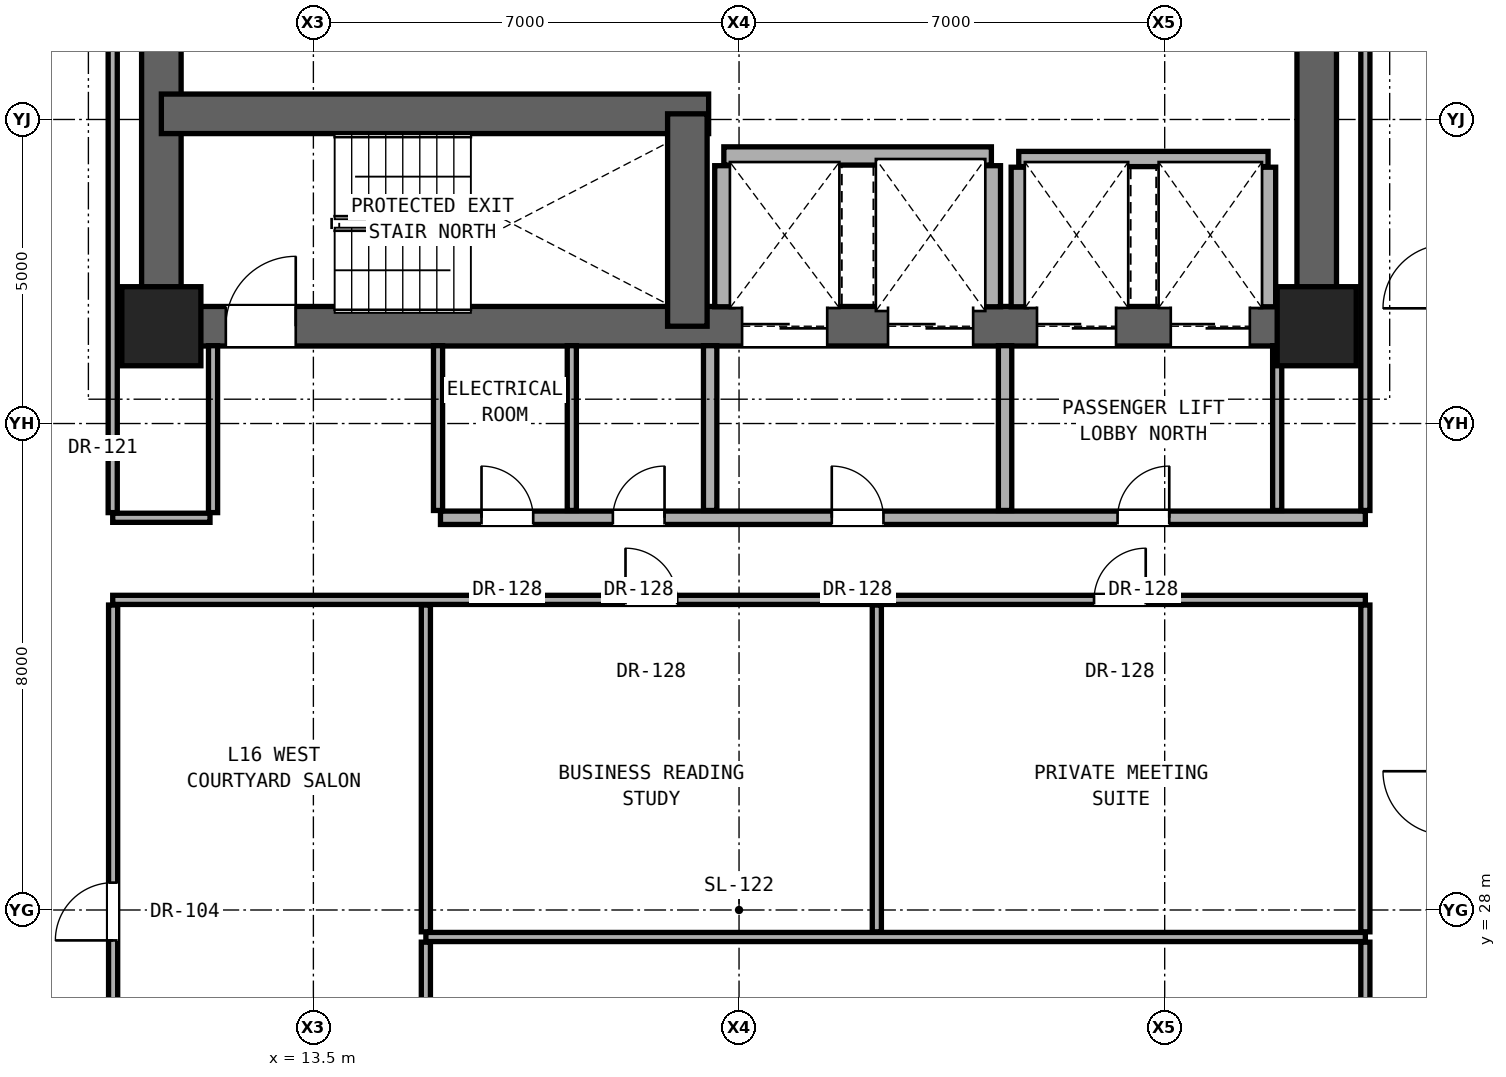
"""IFC4 building model, lengths in metres.
Left out: names, types, materials, properties, quantities, classifications, styles, units other than length and angle.
Written with IfcOpenShell. Run it as: python <this file> out.ifc"""

import sys

from ifc_helpers import new_model, si_unit, direction, frame, frame_2d, origin, origin_2d, place, context, subcontext, project, spatial, rectangle, extrude, element, fill, save


model = new_model("IFC4")
c1 = context("Model", 3, precision=1e-05, world=origin(), true_north=direction((0.0, 1.0)))
c2 = subcontext(c1, "Body", "Model", "MODEL_VIEW")
j1 = project(units=[si_unit("LENGTHUNIT", "METRE"), si_unit("PLANEANGLEUNIT", "RADIAN")], contexts=[c1])
p1 = place(None, origin())
s1 = spatial("IfcSite", under=j1, at=p1, CompositionType="ELEMENT")
p2 = place(p1, origin())
s2 = spatial("IfcBuilding", under=s1, at=p2, CompositionType="ELEMENT")
p3 = place(p2, frame((0.0, 0.0, 58.7)))
s3 = spatial("IfcBuildingStorey", under=s2, at=p3, CompositionType="ELEMENT", Elevation=58.7)
for number, where, z_axis, x_axis in (
    (1, (11.0, 37.6, 0.0), (0.0, 0.0, 1.0), (1.0, 0.0, 0.0)),
    (2, (30.0, 37.6, 0.0), (0.0, 0.0, 1.0), (1.0, 0.0, 0.0)),
):
    element("IfcColumn", number, at=place(p3, frame(where, z_axis=z_axis, x_axis=x_axis)), inside=s3, PredefinedType="COLUMN", context=c2, shape_type="SweptSolid", body=[
        extrude(rectangle(XDim=1.3, YDim=1.3, at=origin_2d()), origin(), (0.0, 0.0, 1.0), 3.3),
    ])
for number, where, z_axis, x_axis in (
    (3, (11.0, 37.6, 0.0), (0.0, 0.0, 1.0), (0.0, 1.0, 0.0)),
    (4, (30.0, 37.6, 0.0), (0.0, 0.0, 1.0), (0.0, 1.0, 0.0)),
):
    element("IfcWall", number, at=place(p3, frame(where, z_axis=z_axis, x_axis=x_axis)), inside=s3, PredefinedType="SHEAR", context=c2, shape_type="SweptSolid", body=[
        extrude(rectangle(XDim=6.0, YDim=0.65, at=frame_2d((3.0, 0.0))), origin(), (0.0, 0.0, 1.0), 3.06),
    ])
p4 = place(p3, frame((11.0, 37.6, 0.0), z_axis=(0.0, 0.0, 1.0), x_axis=(1.0, 0.0, 0.0)))
e5 = element("IfcWall", 5, at=p4, inside=s3, PredefinedType="SHEAR", context=c2, shape_type="SweptSolid", body=[
    extrude(rectangle(XDim=19.0, YDim=0.65, at=frame_2d((9.5, 0.0))), origin(), (0.0, 0.0, 1.0), 3.06),
])
p5 = place(p4, frame((1.06, 0.0, 0.0)))
e6 = element("IfcOpeningElement", 6, at=p5, cuts=e5, PredefinedType="OPENING", context=c2, shape_type="SweptSolid", body=[
    extrude(rectangle(XDim=1.15, YDim=2.2, at=frame_2d((0.575, 1.1))), frame((0.0, 0.335, 0.0), z_axis=(0.0, -1.0, 0.0), x_axis=(1.0, 0.0, 0.0)), (0.0, 0.0, 1.0), 0.67),
])
p6 = place(p4, frame((9.55, 0.0, 0.0)))
e7 = element("IfcOpeningElement", 7, at=p6, cuts=e5, PredefinedType="OPENING", context=c2, shape_type="SweptSolid", body=[
    extrude(rectangle(XDim=1.4, YDim=2.35, at=frame_2d((0.7, 1.175))), frame((0.0, 0.335, 0.0), z_axis=(0.0, -1.0, 0.0), x_axis=(1.0, 0.0, 0.0)), (0.0, 0.0, 1.0), 0.67),
])
p7 = place(p4, frame((11.95, 0.0, 0.0)))
e8 = element("IfcOpeningElement", 8, at=p7, cuts=e5, PredefinedType="OPENING", context=c2, shape_type="SweptSolid", body=[
    extrude(rectangle(XDim=1.4, YDim=2.35, at=frame_2d((0.7, 1.175))), frame((0.0, 0.335, 0.0), z_axis=(0.0, -1.0, 0.0), x_axis=(1.0, 0.0, 0.0)), (0.0, 0.0, 1.0), 0.67),
])
p8 = place(p4, frame((14.4, 0.0, 0.0)))
e9 = element("IfcOpeningElement", 9, at=p8, cuts=e5, PredefinedType="OPENING", context=c2, shape_type="SweptSolid", body=[
    extrude(rectangle(XDim=1.3, YDim=2.3, at=frame_2d((0.65, 1.15))), frame((0.0, 0.335, 0.0), z_axis=(0.0, -1.0, 0.0), x_axis=(1.0, 0.0, 0.0)), (0.0, 0.0, 1.0), 0.67),
])
p9 = place(p4, frame((16.6, 0.0, 0.0)))
e10 = element("IfcOpeningElement", 10, at=p9, cuts=e5, PredefinedType="OPENING", context=c2, shape_type="SweptSolid", body=[
    extrude(rectangle(XDim=1.3, YDim=2.3, at=frame_2d((0.65, 1.15))), frame((0.0, 0.335, 0.0), z_axis=(0.0, -1.0, 0.0), x_axis=(1.0, 0.0, 0.0)), (0.0, 0.0, 1.0), 0.67),
])
p10 = place(p3, frame((11.0, 41.093, 0.0), z_axis=(0.0, 0.0, 1.0), x_axis=(1.0, 0.0, 0.0)))
e11 = element("IfcWall", 11, at=p10, inside=s3, PredefinedType="SHEAR", context=c2, shape_type="SweptSolid", body=[
    extrude(rectangle(XDim=9.0, YDim=0.65, at=frame_2d((4.5, 0.0))), origin(), (0.0, 0.0, 1.0), 3.06),
])
p11 = place(p3, frame((19.65, 37.6, 0.0), z_axis=(0.0, 0.0, 1.0), x_axis=(0.0, 1.0, 0.0)))
e12 = element("IfcWall", 12, at=p11, inside=s3, PredefinedType="SHEAR", context=c2, shape_type="SweptSolid", body=[
    extrude(rectangle(XDim=3.493, YDim=0.65, at=frame_2d((1.747, 0.0))), origin(), (0.0, 0.0, 1.0), 3.06),
])
p12 = place(p3, frame((15.35, 27.556, 0.0), z_axis=(0.0, 0.0, 1.0), x_axis=(1.0, 0.0, 0.0)))
e13 = element("IfcWall", 13, at=p12, inside=s3, PredefinedType="PARTITIONING", context=c2, shape_type="SweptSolid", body=[
    extrude(rectangle(XDim=15.45, YDim=0.15, at=frame_2d((7.725, 0.0))), origin(), (0.0, 0.0, 1.0), 2.104),
])
p13 = place(p3, frame((10.2, 33.1, 0.0), z_axis=(0.0, 0.0, 1.0), x_axis=(1.0, 0.0, 0.0)))
e14 = element("IfcWall", 14, at=p13, inside=s3, PredefinedType="PARTITIONING", context=c2, shape_type="SweptSolid", body=[
    extrude(rectangle(XDim=20.6, YDim=0.15, at=frame_2d((10.3, 0.0))), origin(), (0.0, 0.0, 1.0), 2.104),
])
p14 = place(p13, frame((8.433, 0.0, 0.0)))
e15 = element("IfcOpeningElement", 15, at=p14, cuts=e14, PredefinedType="OPENING", context=c2, shape_type="SweptSolid", body=[
    extrude(rectangle(XDim=0.85, YDim=2.01, at=frame_2d((0.425, 1.005))), frame((0.0, 0.085, 0.0), z_axis=(0.0, -1.0, 0.0), x_axis=(1.0, 0.0, 0.0)), (0.0, 0.0, 1.0), 0.17),
])
p15 = place(p13, frame((16.138, 0.0, 0.0)))
e16 = element("IfcOpeningElement", 16, at=p15, cuts=e14, PredefinedType="OPENING", context=c2, shape_type="SweptSolid", body=[
    extrude(rectangle(XDim=0.85, YDim=2.01, at=frame_2d((0.425, 1.005))), frame((0.0, 0.085, 0.0), z_axis=(0.0, -1.0, 0.0), x_axis=(1.0, 0.0, 0.0)), (0.0, 0.0, 1.0), 0.17),
])
p16 = place(p3, frame((10.2, 34.45, 0.0), z_axis=(0.0, 0.0, 1.0), x_axis=(1.0, 0.0, 0.0)))
e17 = element("IfcWall", 17, at=p16, inside=s3, PredefinedType="PARTITIONING", context=c2, shape_type="SweptSolid", body=[
    extrude(rectangle(XDim=1.6, YDim=0.15, at=frame_2d((0.8, 0.0))), origin(), (0.0, 0.0, 1.0), 2.104),
])
p17 = place(p3, frame((15.59, 34.45, 0.0), z_axis=(0.0, 0.0, 1.0), x_axis=(1.0, 0.0, 0.0)))
e18 = element("IfcWall", 18, at=p17, inside=s3, PredefinedType="SOLIDWALL", context=c2, shape_type="SweptSolid", body=[
    extrude(rectangle(XDim=15.21, YDim=0.22, at=frame_2d((7.605, 0.0))), origin(), (0.0, 0.0, 1.0), 2.104),
])
p18 = place(p17, frame((6.435, 0.0, 0.0)))
e19 = element("IfcOpeningElement", 19, at=p18, cuts=e18, PredefinedType="OPENING", context=c2, shape_type="SweptSolid", body=[
    extrude(rectangle(XDim=0.85, YDim=2.01, at=frame_2d((0.425, 1.005))), frame((0.0, 0.12, 0.0), z_axis=(0.0, -1.0, 0.0), x_axis=(1.0, 0.0, 0.0)), (0.0, 0.0, 1.0), 0.24),
])
p19 = place(p17, frame((11.135, 0.0, 0.0)))
e20 = element("IfcOpeningElement", 20, at=p19, cuts=e18, PredefinedType="OPENING", context=c2, shape_type="SweptSolid", body=[
    extrude(rectangle(XDim=0.85, YDim=2.01, at=frame_2d((0.425, 1.005))), frame((0.0, 0.12, 0.0), z_axis=(0.0, -1.0, 0.0), x_axis=(1.0, 0.0, 0.0)), (0.0, 0.0, 1.0), 0.24),
])
p20 = place(p17, frame((0.675, 0.0, 0.0)))
e21 = element("IfcOpeningElement", 21, at=p20, cuts=e18, PredefinedType="OPENING", context=c2, shape_type="SweptSolid", body=[
    extrude(rectangle(XDim=0.85, YDim=2.01, at=frame_2d((0.425, 1.005))), frame((0.0, 0.12, 0.0), z_axis=(0.0, -1.0, 0.0), x_axis=(1.0, 0.0, 0.0)), (0.0, 0.0, 1.0), 0.24),
])
p21 = place(p17, frame((2.835, 0.0, 0.0)))
e22 = element("IfcOpeningElement", 22, at=p21, cuts=e18, PredefinedType="OPENING", context=c2, shape_type="SweptSolid", body=[
    extrude(rectangle(XDim=0.85, YDim=2.01, at=frame_2d((0.425, 1.005))), frame((0.0, 0.12, 0.0), z_axis=(0.0, -1.0, 0.0), x_axis=(1.0, 0.0, 0.0)), (0.0, 0.0, 1.0), 0.24),
])
p22 = place(p3, frame((25.1, 40.35, 0.0), z_axis=(0.0, 0.0, 1.0), x_axis=(1.0, 0.0, 0.0)))
e23 = element("IfcWall", 23, at=p22, inside=s3, PredefinedType="SOLIDWALL", context=c2, shape_type="SweptSolid", body=[
    extrude(rectangle(XDim=4.1, YDim=0.25, at=frame_2d((2.05, 0.0))), origin(), (0.0, 0.0, 1.0), 3.06),
])
p23 = place(p3, frame((20.25, 40.4, 0.0), z_axis=(0.0, 0.0, 1.0), x_axis=(1.0, 0.0, 0.0)))
e24 = element("IfcWall", 24, at=p23, inside=s3, PredefinedType="SOLIDWALL", context=c2, shape_type="SweptSolid", body=[
    extrude(rectangle(XDim=4.4, YDim=0.3, at=frame_2d((2.2, 0.0))), origin(), (0.0, 0.0, 1.0), 3.06),
])
p24 = place(p3, frame((10.207, 22.935, 0.0), z_axis=(0.0, 0.0, 1.0), x_axis=(0.0, 1.0, 0.0)))
e25 = element("IfcWall", 25, at=p24, inside=s3, PredefinedType="PARTITIONING", context=c2, shape_type="SweptSolid", body=[
    extrude(rectangle(XDim=10.08, YDim=0.15, at=frame_2d((5.04, 0.0))), origin(), (0.0, 0.0, 1.0), 2.279),
])
p25 = place(p24, frame((4.565, 0.0, 0.0)))
e26 = element("IfcOpeningElement", 26, at=p25, cuts=e25, PredefinedType="OPENING", context=c2, shape_type="SweptSolid", body=[
    extrude(rectangle(XDim=0.95, YDim=2.15, at=frame_2d((0.475, 1.075))), frame((0.0, 0.085, 0.0), z_axis=(0.0, -1.0, 0.0), x_axis=(1.0, 0.0, 0.0)), (0.0, 0.0, 1.0), 0.17),
])
p26 = place(p3, frame((10.2, 34.535, 0.0), z_axis=(0.0, 0.0, 1.0), x_axis=(0.0, 1.0, 0.0)))
e27 = element("IfcWall", 27, at=p26, inside=s3, PredefinedType="PARTITIONING", context=c2, shape_type="SweptSolid", body=[
    extrude(rectangle(XDim=9.13, YDim=0.15, at=frame_2d((4.565, 0.0))), origin(), (0.0, 0.0, 1.0), 2.436),
])
p27 = place(p3, frame((11.85, 34.535, 0.0), z_axis=(0.0, 0.0, 1.0), x_axis=(0.0, 1.0, 0.0)))
e28 = element("IfcWall", 28, at=p27, inside=s3, PredefinedType="PARTITIONING", context=c2, shape_type="SweptSolid", body=[
    extrude(rectangle(XDim=2.745, YDim=0.15, at=frame_2d((1.373, 0.0))), origin(), (0.0, 0.0, 1.0), 3.06),
])
p28 = place(p3, frame((15.35, 22.935, 0.0), z_axis=(0.0, 0.0, 1.0), x_axis=(0.0, 1.0, 0.0)))
e29 = element("IfcWall", 29, at=p28, inside=s3, PredefinedType="PARTITIONING", context=c2, shape_type="SweptSolid", body=[
    extrude(rectangle(XDim=4.536, YDim=0.15, at=frame_2d((2.268, 0.0))), origin(), (0.0, 0.0, 1.0), 2.104),
])
p29 = place(p3, frame((15.35, 27.641, 0.0), z_axis=(0.0, 0.0, 1.0), x_axis=(0.0, 1.0, 0.0)))
e30 = element("IfcWall", 30, at=p29, inside=s3, PredefinedType="PARTITIONING", context=c2, shape_type="SweptSolid", body=[
    extrude(rectangle(XDim=5.374, YDim=0.15, at=frame_2d((2.687, 0.0))), origin(), (0.0, 0.0, 1.0), 2.104),
])
p30 = place(p3, frame((15.55, 34.57, 0.0), z_axis=(0.0, 0.0, 1.0), x_axis=(0.0, 1.0, 0.0)))
e31 = element("IfcWall", 31, at=p30, inside=s3, PredefinedType="PARTITIONING", context=c2, shape_type="SweptSolid", body=[
    extrude(rectangle(XDim=2.71, YDim=0.15, at=frame_2d((1.355, 0.0))), origin(), (0.0, 0.0, 1.0), 2.589),
])
p31 = place(p3, frame((17.75, 34.57, 0.0), z_axis=(0.0, 0.0, 1.0), x_axis=(0.0, 1.0, 0.0)))
e32 = element("IfcWall", 32, at=p31, inside=s3, PredefinedType="PARTITIONING", context=c2, shape_type="SweptSolid", body=[
    extrude(rectangle(XDim=2.71, YDim=0.15, at=frame_2d((1.355, 0.0))), origin(), (0.0, 0.0, 1.0), 3.06),
])
p32 = place(p3, frame((20.025, 34.57, 0.0), z_axis=(0.0, 0.0, 1.0), x_axis=(0.0, 1.0, 0.0)))
e33 = element("IfcWall", 33, at=p32, inside=s3, PredefinedType="SOLIDWALL", context=c2, shape_type="SweptSolid", body=[
    extrude(rectangle(XDim=2.71, YDim=0.22, at=frame_2d((1.355, 0.0))), origin(), (0.0, 0.0, 1.0), 3.06),
])
p33 = place(p3, frame((20.25, 37.92, 0.0), z_axis=(0.0, 0.0, 1.0), x_axis=(0.0, 1.0, 0.0)))
e34 = element("IfcWall", 34, at=p33, inside=s3, PredefinedType="SOLIDWALL", context=c2, shape_type="SweptSolid", body=[
    extrude(rectangle(XDim=2.32, YDim=0.3, at=frame_2d((1.16, 0.0))), origin(), (0.0, 0.0, 1.0), 3.06),
])
p34 = place(p3, frame((22.766, 27.641, 0.0), z_axis=(0.0, 0.0, 1.0), x_axis=(0.0, 1.0, 0.0)))
e35 = element("IfcWall", 35, at=p34, inside=s3, PredefinedType="PARTITIONING", context=c2, shape_type="SweptSolid", body=[
    extrude(rectangle(XDim=5.374, YDim=0.15, at=frame_2d((2.687, 0.0))), origin(), (0.0, 0.0, 1.0), 2.104),
])
p35 = place(p3, frame((24.65, 37.92, 0.0), z_axis=(0.0, 0.0, 1.0), x_axis=(0.0, 1.0, 0.0)))
e36 = element("IfcWall", 36, at=p35, inside=s3, PredefinedType="SOLIDWALL", context=c2, shape_type="SweptSolid", body=[
    extrude(rectangle(XDim=2.32, YDim=0.3, at=frame_2d((1.16, 0.0))), origin(), (0.0, 0.0, 1.0), 3.06),
])
p36 = place(p3, frame((24.875, 34.57, 0.0), z_axis=(0.0, 0.0, 1.0), x_axis=(0.0, 1.0, 0.0)))
e37 = element("IfcWall", 37, at=p36, inside=s3, PredefinedType="SOLIDWALL", context=c2, shape_type="SweptSolid", body=[
    extrude(rectangle(XDim=2.71, YDim=0.22, at=frame_2d((1.355, 0.0))), origin(), (0.0, 0.0, 1.0), 3.06),
])
p37 = place(p3, frame((25.1, 37.92, 0.0), z_axis=(0.0, 0.0, 1.0), x_axis=(0.0, 1.0, 0.0)))
e38 = element("IfcWall", 38, at=p37, inside=s3, PredefinedType="SOLIDWALL", context=c2, shape_type="SweptSolid", body=[
    extrude(rectangle(XDim=2.295, YDim=0.25, at=frame_2d((1.147, 0.0))), origin(), (0.0, 0.0, 1.0), 3.06),
])
p38 = place(p3, frame((29.35, 34.57, 0.0), z_axis=(0.0, 0.0, 1.0), x_axis=(0.0, 1.0, 0.0)))
e39 = element("IfcWall", 39, at=p38, inside=s3, PredefinedType="PARTITIONING", context=c2, shape_type="SweptSolid", body=[
    extrude(rectangle(XDim=2.71, YDim=0.15, at=frame_2d((1.355, 0.0))), origin(), (0.0, 0.0, 1.0), 3.06),
])
p39 = place(p3, frame((29.2, 37.92, 0.0), z_axis=(0.0, 0.0, 1.0), x_axis=(0.0, 1.0, 0.0)))
e40 = element("IfcWall", 40, at=p39, inside=s3, PredefinedType="SOLIDWALL", context=c2, shape_type="SweptSolid", body=[
    extrude(rectangle(XDim=2.295, YDim=0.25, at=frame_2d((1.147, 0.0))), origin(), (0.0, 0.0, 1.0), 3.06),
])
p40 = place(p3, frame((30.8, 19.985, 0.0), z_axis=(0.0, 0.0, 1.0), x_axis=(0.0, 1.0, 0.0)))
e41 = element("IfcWall", 41, at=p40, inside=s3, PredefinedType="PARTITIONING", context=c2, shape_type="SweptSolid", body=[
    extrude(rectangle(XDim=7.486, YDim=0.15, at=frame_2d((3.743, 0.0))), origin(), (0.0, 0.0, 1.0), 2.279),
])
p41 = place(p3, frame((30.8, 27.641, 0.0), z_axis=(0.0, 0.0, 1.0), x_axis=(0.0, 1.0, 0.0)))
e42 = element("IfcWall", 42, at=p41, inside=s3, PredefinedType="PARTITIONING", context=c2, shape_type="SweptSolid", body=[
    extrude(rectangle(XDim=5.374, YDim=0.15, at=frame_2d((2.687, 0.0))), origin(), (0.0, 0.0, 1.0), 2.279),
])
p42 = place(p3, frame((30.8, 34.57, 0.0), z_axis=(0.0, 0.0, 1.0), x_axis=(0.0, 1.0, 0.0)))
e43 = element("IfcWall", 43, at=p42, inside=s3, PredefinedType="PARTITIONING", context=c2, shape_type="SweptSolid", body=[
    extrude(rectangle(XDim=9.095, YDim=0.15, at=frame_2d((4.547, 0.0))), origin(), (0.0, 0.0, 1.0), 2.436),
])
p43 = place(p5, origin())
e44 = element("IfcDoor", 44, at=p43, inside=s3, OperationType="SINGLE_SWING_RIGHT", PredefinedType="DOOR", context=c2, shape_type="SweptSolid", body=[
    extrude(rectangle(XDim=1.15, YDim=2.2, at=frame_2d((0.575, 1.1))), frame((0.0, 0.025, 0.0), z_axis=(0.0, -1.0, 0.0), x_axis=(1.0, 0.0, 0.0)), (0.0, 0.0, 1.0), 0.05),
])
fill(e6, e44)
p44 = place(p18, origin())
e45 = element("IfcDoor", 45, at=p44, inside=s3, OperationType="SINGLE_SWING_LEFT", PredefinedType="DOOR", context=c2, shape_type="SweptSolid", body=[
    extrude(rectangle(XDim=0.85, YDim=2.01, at=frame_2d((0.425, 1.005))), frame((0.0, 0.025, 0.0), z_axis=(0.0, -1.0, 0.0), x_axis=(1.0, 0.0, 0.0)), (0.0, 0.0, 1.0), 0.05),
])
fill(e19, e45)
p45 = place(p19, origin())
e46 = element("IfcDoor", 46, at=p45, inside=s3, OperationType="SINGLE_SWING_RIGHT", PredefinedType="DOOR", context=c2, shape_type="SweptSolid", body=[
    extrude(rectangle(XDim=0.85, YDim=2.01, at=frame_2d((0.425, 1.005))), frame((0.0, 0.025, 0.0), z_axis=(0.0, -1.0, 0.0), x_axis=(1.0, 0.0, 0.0)), (0.0, 0.0, 1.0), 0.05),
])
fill(e20, e46)
p46 = place(p20, origin())
e47 = element("IfcDoor", 47, at=p46, inside=s3, OperationType="SINGLE_SWING_LEFT", PredefinedType="DOOR", context=c2, shape_type="SweptSolid", body=[
    extrude(rectangle(XDim=0.85, YDim=2.01, at=frame_2d((0.425, 1.005))), frame((0.0, 0.025, 0.0), z_axis=(0.0, -1.0, 0.0), x_axis=(1.0, 0.0, 0.0)), (0.0, 0.0, 1.0), 0.05),
])
fill(e21, e47)
p47 = place(p21, origin())
e48 = element("IfcDoor", 48, at=p47, inside=s3, OperationType="SINGLE_SWING_RIGHT", PredefinedType="DOOR", context=c2, shape_type="SweptSolid", body=[
    extrude(rectangle(XDim=0.85, YDim=2.01, at=frame_2d((0.425, 1.005))), frame((0.0, 0.025, 0.0), z_axis=(0.0, -1.0, 0.0), x_axis=(1.0, 0.0, 0.0)), (0.0, 0.0, 1.0), 0.05),
])
fill(e22, e48)
p48 = place(p25, origin())
e49 = element("IfcDoor", 49, at=p48, inside=s3, OperationType="SINGLE_SWING_LEFT", PredefinedType="DOOR", context=c2, shape_type="SweptSolid", body=[
    extrude(rectangle(XDim=0.95, YDim=2.15, at=frame_2d((0.475, 1.075))), frame((0.0, 0.025, 0.0), z_axis=(0.0, -1.0, 0.0), x_axis=(1.0, 0.0, 0.0)), (0.0, 0.0, 1.0), 0.05),
])
fill(e26, e49)
p49 = place(p14, origin())
e50 = element("IfcDoor", 50, at=p49, inside=s3, OperationType="SINGLE_SWING_LEFT", PredefinedType="DOOR", context=c2, shape_type="SweptSolid", body=[
    extrude(rectangle(XDim=0.85, YDim=2.01, at=frame_2d((0.425, 1.005))), frame((0.0, 0.025, 0.0), z_axis=(0.0, -1.0, 0.0), x_axis=(1.0, 0.0, 0.0)), (0.0, 0.0, 1.0), 0.05),
])
fill(e15, e50)
p50 = place(p15, origin())
e51 = element("IfcDoor", 51, at=p50, inside=s3, OperationType="SINGLE_SWING_RIGHT", PredefinedType="DOOR", context=c2, shape_type="SweptSolid", body=[
    extrude(rectangle(XDim=0.85, YDim=2.01, at=frame_2d((0.425, 1.005))), frame((0.0, 0.025, 0.0), z_axis=(0.0, -1.0, 0.0), x_axis=(1.0, 0.0, 0.0)), (0.0, 0.0, 1.0), 0.05),
])
fill(e16, e51)
p51 = place(p6, origin())
e52 = element("IfcDoor", 52, at=p51, inside=s3, OperationType="DOUBLE_DOOR_SLIDING", PredefinedType="DOOR", context=c2, shape_type="SweptSolid", body=[
    extrude(rectangle(XDim=1.4, YDim=2.35, at=frame_2d((0.7, 1.175))), frame((0.0, 0.025, 0.0), z_axis=(0.0, -1.0, 0.0), x_axis=(1.0, 0.0, 0.0)), (0.0, 0.0, 1.0), 0.05),
])
fill(e7, e52)
p52 = place(p7, origin())
e53 = element("IfcDoor", 53, at=p52, inside=s3, OperationType="DOUBLE_DOOR_SLIDING", PredefinedType="DOOR", context=c2, shape_type="SweptSolid", body=[
    extrude(rectangle(XDim=1.4, YDim=2.35, at=frame_2d((0.7, 1.175))), frame((0.0, 0.025, 0.0), z_axis=(0.0, -1.0, 0.0), x_axis=(1.0, 0.0, 0.0)), (0.0, 0.0, 1.0), 0.05),
])
fill(e8, e53)
p53 = place(p8, origin())
e54 = element("IfcDoor", 54, at=p53, inside=s3, OperationType="DOUBLE_DOOR_SLIDING", PredefinedType="DOOR", context=c2, shape_type="SweptSolid", body=[
    extrude(rectangle(XDim=1.3, YDim=2.3, at=frame_2d((0.65, 1.15))), frame((0.0, 0.025, 0.0), z_axis=(0.0, -1.0, 0.0), x_axis=(1.0, 0.0, 0.0)), (0.0, 0.0, 1.0), 0.05),
])
fill(e9, e54)
p54 = place(p9, origin())
e55 = element("IfcDoor", 55, at=p54, inside=s3, OperationType="DOUBLE_DOOR_SLIDING", PredefinedType="DOOR", context=c2, shape_type="SweptSolid", body=[
    extrude(rectangle(XDim=1.3, YDim=2.3, at=frame_2d((0.65, 1.15))), frame((0.0, 0.025, 0.0), z_axis=(0.0, -1.0, 0.0), x_axis=(1.0, 0.0, 0.0)), (0.0, 0.0, 1.0), 0.05),
])
fill(e10, e55)
save(model, sys.argv[1])
